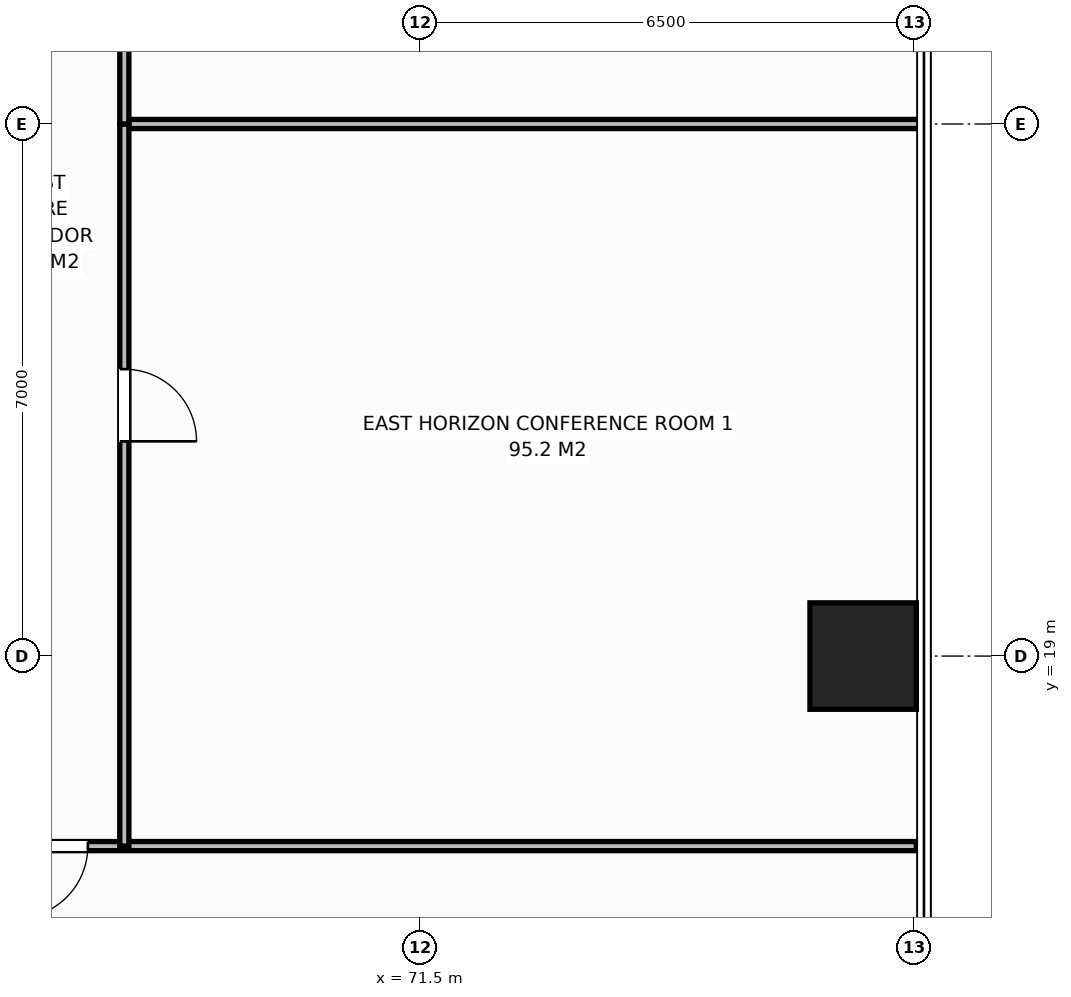
"""IFC4 building model, lengths in metres.
Left out: names, types, materials, properties, quantities, classifications, styles, units other than length and angle.
Written with IfcOpenShell. Run it as: python <this file> out.ifc"""

import sys

from ifc_helpers import new_model, si_unit, direction, frame, frame_2d, origin, origin_2d, place, context, subcontext, project, spatial, rectangle, extrude, element, fill, save


model = new_model("IFC4")
c1 = context("Model", 3, precision=1e-05, world=origin(), true_north=direction((0.0, 1.0)))
c2 = subcontext(c1, "Body", "Model", "MODEL_VIEW")
j1 = project(units=[si_unit("LENGTHUNIT", "METRE"), si_unit("PLANEANGLEUNIT", "RADIAN")], contexts=[c1])
p1 = place(None, origin())
s1 = spatial("IfcSite", under=j1, at=p1, CompositionType="ELEMENT")
p2 = place(p1, origin())
s2 = spatial("IfcBuilding", under=s1, at=p2, CompositionType="ELEMENT")
p3 = place(p2, frame((0.0, 0.0, 62.0)))
s3 = spatial("IfcBuildingStorey", under=s2, at=p3, CompositionType="ELEMENT", Elevation=62.0)
p4 = place(p3, frame((77.32, 19.0, 0.0), z_axis=(0.0, 0.0, 1.0), x_axis=(1.0, 0.0, 0.0)))
e1 = element("IfcColumn", 1, at=p4, inside=s3, PredefinedType="COLUMN", context=c2, shape_type="SweptSolid", body=[
    extrude(rectangle(XDim=1.4, YDim=1.4, at=origin_2d()), origin(), (0.0, 0.0, 1.0), 3.8),
])
p5 = place(p3, frame((64.86, 16.5, 0.0), z_axis=(0.0, 0.0, 1.0), x_axis=(1.0, 0.0, 0.0)))
e2 = element("IfcWall", 2, at=p5, inside=s3, PredefinedType="PARTITIONING", context=c2, shape_type="SweptSolid", body=[
    extrude(rectangle(XDim=13.16, YDim=0.12, at=frame_2d((6.58, 0.0))), origin(), (0.0, 0.0, 1.0), 3.55),
])
p6 = place(p5, frame((1.31, 0.0, 0.0)))
e3 = element("IfcOpeningElement", 3, at=p6, cuts=e2, PredefinedType="OPENING", context=c2, shape_type="SweptSolid", body=[
    extrude(rectangle(XDim=0.95, YDim=2.15, at=frame_2d((0.475, 1.075))), frame((0.0, 0.07, 0.0), z_axis=(0.0, -1.0, 0.0), x_axis=(1.0, 0.0, 0.0)), (0.0, 0.0, 1.0), 0.14),
])
p7 = place(p3, frame((67.6, 26.0, 0.0), z_axis=(0.0, 0.0, 1.0), x_axis=(1.0, 0.0, 0.0)))
e4 = element("IfcWall", 4, at=p7, inside=s3, PredefinedType="PARTITIONING", context=c2, shape_type="SweptSolid", body=[
    extrude(rectangle(XDim=10.58, YDim=0.12, at=frame_2d((5.29, 0.0))), origin(), (0.0, 0.0, 1.0), 3.55),
])
p8 = place(p3, frame((67.6, 16.5, 0.0), z_axis=(0.0, 0.0, 1.0), x_axis=(0.0, 1.0, 0.0)))
e5 = element("IfcWall", 5, at=p8, inside=s3, PredefinedType="PARTITIONING", context=c2, shape_type="SweptSolid", body=[
    extrude(rectangle(XDim=9.5, YDim=0.12, at=frame_2d((4.75, 0.0))), origin(), (0.0, 0.0, 1.0), 3.55),
])
p9 = place(p8, frame((5.325, 0.0, 0.0)))
e6 = element("IfcOpeningElement", 6, at=p9, cuts=e5, PredefinedType="OPENING", context=c2, shape_type="SweptSolid", body=[
    extrude(rectangle(XDim=0.95, YDim=2.15, at=frame_2d((0.475, 1.075))), frame((0.0, 0.07, 0.0), z_axis=(0.0, -1.0, 0.0), x_axis=(1.0, 0.0, 0.0)), (0.0, 0.0, 1.0), 0.14),
])
p10 = place(p3, frame((67.6, 26.0, 0.0), z_axis=(0.0, 0.0, 1.0), x_axis=(0.0, 1.0, 0.0)))
e7 = element("IfcWall", 7, at=p10, inside=s3, PredefinedType="PARTITIONING", context=c2, shape_type="SweptSolid", body=[
    extrude(rectangle(XDim=9.5, YDim=0.12, at=frame_2d((4.75, 0.0))), origin(), (0.0, 0.0, 1.0), 3.55),
])
p11 = place(p10, frame((3.225, 0.0, 0.0)))
e8 = element("IfcOpeningElement", 8, at=p11, cuts=e7, PredefinedType="OPENING", context=c2, shape_type="SweptSolid", body=[
    extrude(rectangle(XDim=0.95, YDim=2.15, at=frame_2d((0.475, 1.075))), frame((0.0, 0.07, 0.0), z_axis=(0.0, -1.0, 0.0), x_axis=(1.0, 0.0, 0.0)), (0.0, 0.0, 1.0), 0.14),
])
p12 = place(p6, origin())
e9 = element("IfcDoor", 9, at=p12, inside=s3, OperationType="SINGLE_SWING_RIGHT", PredefinedType="DOOR", context=c2, shape_type="SweptSolid", body=[
    extrude(rectangle(XDim=0.95, YDim=2.15, at=frame_2d((0.475, 1.075))), frame((0.0, 0.025, 0.0), z_axis=(0.0, -1.0, 0.0), x_axis=(1.0, 0.0, 0.0)), (0.0, 0.0, 1.0), 0.05),
])
fill(e3, e9)
p13 = place(p9, origin())
e10 = element("IfcDoor", 10, at=p13, inside=s3, OperationType="SINGLE_SWING_RIGHT", PredefinedType="DOOR", context=c2, shape_type="SweptSolid", body=[
    extrude(rectangle(XDim=0.95, YDim=2.15, at=frame_2d((0.475, 1.075))), frame((0.0, 0.025, 0.0), z_axis=(0.0, -1.0, 0.0), x_axis=(1.0, 0.0, 0.0)), (0.0, 0.0, 1.0), 0.05),
])
fill(e6, e10)
save(model, sys.argv[1])
